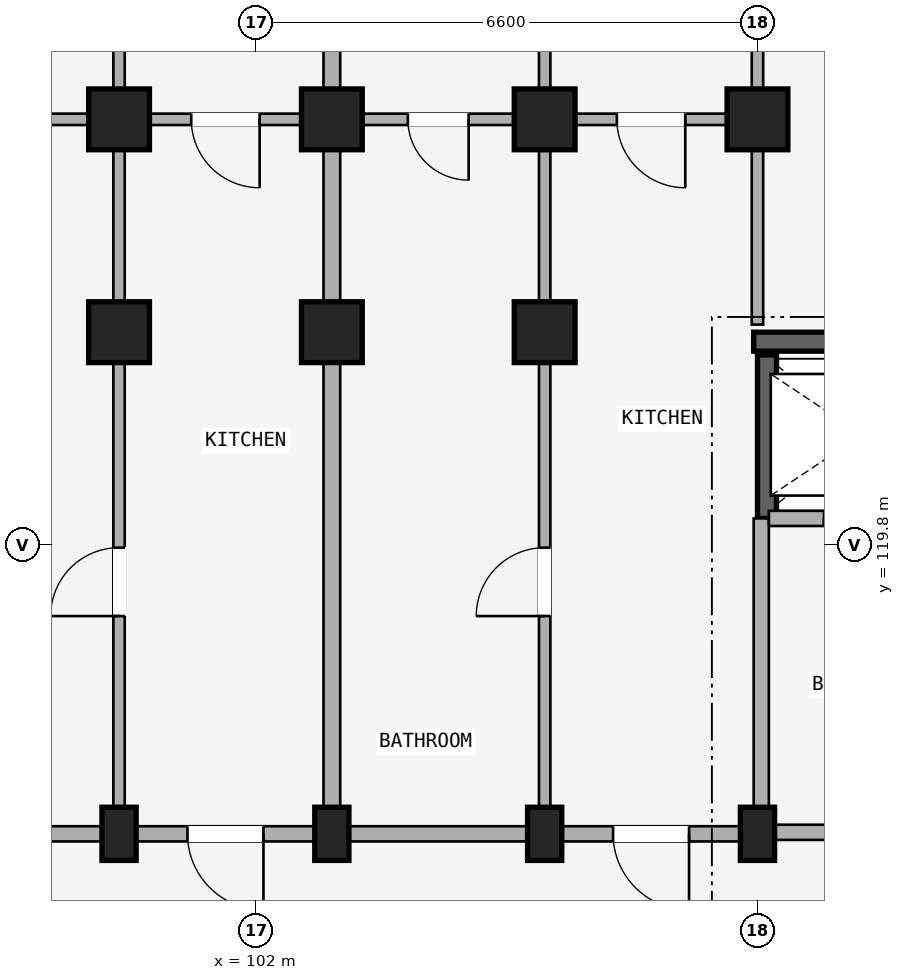
"""IFC4 building model, lengths in metres.
Left out: names, types, materials, properties, quantities, classifications, styles, units other than length and angle.
Written with IfcOpenShell. Run it as: python <this file> out.ifc"""

import sys

from ifc_helpers import new_model, si_unit, direction, frame, frame_2d, origin, origin_2d, place, context, subcontext, project, spatial, rectangle, extrude, element, fill, save


model = new_model("IFC4")
c1 = context("Model", 3, precision=1e-05, world=origin(), true_north=direction((0.0, 1.0)))
c2 = subcontext(c1, "Body", "Model", "MODEL_VIEW")
j1 = project(units=[si_unit("LENGTHUNIT", "METRE"), si_unit("PLANEANGLEUNIT", "RADIAN")], contexts=[c1])
p1 = place(None, origin())
s1 = spatial("IfcSite", under=j1, at=p1, CompositionType="ELEMENT")
p2 = place(p1, origin())
s2 = spatial("IfcBuilding", under=s1, at=p2, CompositionType="ELEMENT")
p3 = place(p2, frame((0.0, 0.0, 15.0)))
s3 = spatial("IfcBuildingStorey", under=s2, at=p3, CompositionType="ELEMENT", Elevation=15.0)
p4 = place(p3, frame((111.35, 122.475, 0.0), z_axis=(0.0, 0.0, 1.0), x_axis=(-1.0, 0.0, 0.0)))
e1 = element("IfcWall", 1, at=p4, inside=s3, PredefinedType="SHEAR", context=c2, shape_type="SweptSolid", body=[
    extrude(rectangle(XDim=2.8, YDim=0.25, at=frame_2d((1.4, 0.0))), origin(), (0.0, 0.0, 1.0), 2.93),
])
p5 = place(p3, frame((108.725, 120.15, 0.0), z_axis=(0.0, 0.0, 1.0), x_axis=(0.0, 1.0, 0.0)))
e2 = element("IfcWall", 2, at=p5, inside=s3, PredefinedType="SHEAR", context=c2, shape_type="SweptSolid", body=[
    extrude(rectangle(XDim=2.15, YDim=0.25, at=frame_2d((1.075, 0.0))), origin(), (0.0, 0.0, 1.0), 2.93),
])
p6 = place(p3, frame((108.6, 116.0, 0.0), z_axis=(0.0, 0.0, 1.0), x_axis=(1.0, 0.0, 0.0)))
e3 = element("IfcColumn", 3, at=p6, inside=s3, PredefinedType="COLUMN", context=c2, shape_type="SweptSolid", body=[
    extrude(rectangle(XDim=0.45, YDim=0.7, at=origin_2d()), origin(), (0.0, 0.0, 1.0), 2.93),
])
p7 = place(p3, frame((108.6, 125.4, 0.0), z_axis=(0.0, 0.0, 1.0), x_axis=(1.0, 0.0, 0.0)))
e4 = element("IfcColumn", 4, at=p7, inside=s3, PredefinedType="COLUMN", context=c2, shape_type="SweptSolid", body=[
    extrude(rectangle(XDim=0.8, YDim=0.8, at=origin_2d()), origin(), (0.0, 0.0, 1.0), 2.93),
])
p8 = place(p3, frame((105.8, 116.0, 0.0), z_axis=(0.0, 0.0, 1.0), x_axis=(1.0, 0.0, 0.0)))
e5 = element("IfcColumn", 5, at=p8, inside=s3, PredefinedType="COLUMN", context=c2, shape_type="SweptSolid", body=[
    extrude(rectangle(XDim=0.45, YDim=0.7, at=origin_2d()), origin(), (0.0, 0.0, 1.0), 2.93),
])
for number, where, z_axis, x_axis in (
    (6, (105.8, 122.6, 0.0), (0.0, 0.0, 1.0), (1.0, 0.0, 0.0)),
    (7, (105.8, 125.4, 0.0), (0.0, 0.0, 1.0), (1.0, 0.0, 0.0)),
):
    element("IfcColumn", number, at=place(p3, frame(where, z_axis=z_axis, x_axis=x_axis)), inside=s3, PredefinedType="COLUMN", context=c2, shape_type="SweptSolid", body=[
        extrude(rectangle(XDim=0.8, YDim=0.8, at=origin_2d()), origin(), (0.0, 0.0, 1.0), 2.93),
    ])
p9 = place(p3, frame((103.0, 116.0, 0.0), z_axis=(0.0, 0.0, 1.0), x_axis=(1.0, 0.0, 0.0)))
e8 = element("IfcColumn", 8, at=p9, inside=s3, PredefinedType="COLUMN", context=c2, shape_type="SweptSolid", body=[
    extrude(rectangle(XDim=0.45, YDim=0.7, at=origin_2d()), origin(), (0.0, 0.0, 1.0), 2.93),
])
for number, where, z_axis, x_axis in (
    (9, (103.0, 122.6, 0.0), (0.0, 0.0, 1.0), (1.0, 0.0, 0.0)),
    (10, (103.0, 125.4, 0.0), (0.0, 0.0, 1.0), (1.0, 0.0, 0.0)),
):
    element("IfcColumn", number, at=place(p3, frame(where, z_axis=z_axis, x_axis=x_axis)), inside=s3, PredefinedType="COLUMN", context=c2, shape_type="SweptSolid", body=[
        extrude(rectangle(XDim=0.8, YDim=0.8, at=origin_2d()), origin(), (0.0, 0.0, 1.0), 2.93),
    ])
p10 = place(p3, frame((100.2, 116.0, 0.0), z_axis=(0.0, 0.0, 1.0), x_axis=(1.0, 0.0, 0.0)))
e11 = element("IfcColumn", 11, at=p10, inside=s3, PredefinedType="COLUMN", context=c2, shape_type="SweptSolid", body=[
    extrude(rectangle(XDim=0.45, YDim=0.7, at=origin_2d()), origin(), (0.0, 0.0, 1.0), 2.93),
])
for number, where, z_axis, x_axis in (
    (12, (100.2, 122.6, 0.0), (0.0, 0.0, 1.0), (1.0, 0.0, 0.0)),
    (13, (100.2, 125.4, 0.0), (0.0, 0.0, 1.0), (1.0, 0.0, 0.0)),
):
    element("IfcColumn", number, at=place(p3, frame(where, z_axis=z_axis, x_axis=x_axis)), inside=s3, PredefinedType="COLUMN", context=c2, shape_type="SweptSolid", body=[
        extrude(rectangle(XDim=0.8, YDim=0.8, at=origin_2d()), origin(), (0.0, 0.0, 1.0), 2.93),
    ])
p11 = place(p3, frame((114.3, 116.02, 0.0), z_axis=(0.0, 0.0, 1.0), x_axis=(-1.0, 0.0, 0.0)))
e14 = element("IfcWall", 14, at=p11, inside=s3, PredefinedType="STANDARD", context=c2, shape_type="SweptSolid", body=[
    extrude(rectangle(XDim=5.65, YDim=0.2, at=frame_2d((2.825, 0.0))), origin(), (0.0, 0.0, 1.0), 2.372),
])
p12 = place(p11, frame((1.923, 0.0, 0.0)))
e15 = element("IfcOpeningElement", 15, at=p12, cuts=e14, PredefinedType="OPENING", context=c2, shape_type="SweptSolid", body=[
    extrude(rectangle(XDim=1.24, YDim=2.15, at=frame_2d((0.62, 1.075))), frame((0.0, 0.11, 0.0), z_axis=(0.0, -1.0, 0.0), x_axis=(1.0, 0.0, 0.0)), (0.0, 0.0, 1.0), 0.22),
])
p13 = place(p3, frame((108.65, 116.02, 0.0), z_axis=(0.0, 0.0, 1.0), x_axis=(0.0, 1.0, 0.0)))
e16 = element("IfcWall", 16, at=p13, inside=s3, PredefinedType="STANDARD", context=c2, shape_type="SweptSolid", body=[
    extrude(rectangle(XDim=4.13, YDim=0.2, at=frame_2d((2.065, 0.0))), origin(), (0.0, 0.0, 1.0), 2.372),
])
p14 = place(p3, frame((111.3, 120.15, 0.0), z_axis=(0.0, 0.0, 1.0), x_axis=(-1.0, 0.0, 0.0)))
e17 = element("IfcWall", 17, at=p14, inside=s3, PredefinedType="STANDARD", context=c2, shape_type="SweptSolid", body=[
    extrude(rectangle(XDim=2.55, YDim=0.2, at=frame_2d((1.275, 0.0))), origin(), (0.0, 0.0, 1.0), 2.372),
])
p15 = place(p14, frame((0.725, 0.0, 0.0)))
e18 = element("IfcOpeningElement", 18, at=p15, cuts=e17, PredefinedType="OPENING", context=c2, shape_type="SweptSolid", body=[
    extrude(rectangle(XDim=1.1, YDim=2.15, at=frame_2d((0.55, 1.075))), frame((0.0, 0.11, 0.0), z_axis=(0.0, -1.0, 0.0), x_axis=(1.0, 0.0, 0.0)), (0.0, 0.0, 1.0), 0.22),
])
p16 = place(p3, frame((108.6, 116.0, 0.0), z_axis=(0.0, 0.0, 1.0), x_axis=(-1.0, 0.0, 0.0)))
e19 = element("IfcWall", 19, at=p16, inside=s3, PredefinedType="STANDARD", context=c2, shape_type="SweptSolid", body=[
    extrude(rectangle(XDim=2.8, YDim=0.2, at=frame_2d((1.4, 0.0))), origin(), (0.0, 0.0, 1.0), 2.372),
])
p17 = place(p16, frame((0.9, 0.0, 0.0)))
e20 = element("IfcOpeningElement", 20, at=p17, cuts=e19, PredefinedType="OPENING", context=c2, shape_type="SweptSolid", body=[
    extrude(rectangle(XDim=1.0, YDim=2.15, at=frame_2d((0.5, 1.075))), frame((0.0, 0.11, 0.0), z_axis=(0.0, -1.0, 0.0), x_axis=(1.0, 0.0, 0.0)), (0.0, 0.0, 1.0), 0.22),
])
p18 = place(p3, frame((108.52, 125.4, 0.0), z_axis=(0.0, 0.0, 1.0), x_axis=(-1.0, 0.0, 0.0)))
e21 = element("IfcWall", 21, at=p18, inside=s3, PredefinedType="PLUMBINGWALL", context=c2, shape_type="SweptSolid", body=[
    extrude(rectangle(XDim=2.64, YDim=0.15, at=frame_2d((1.32, 0.0))), origin(), (0.0, 0.0, 1.0), 2.372),
])
p19 = place(p18, frame((0.87, 0.0, 0.0)))
e22 = element("IfcOpeningElement", 22, at=p19, cuts=e21, PredefinedType="OPENING", context=c2, shape_type="SweptSolid", body=[
    extrude(rectangle(XDim=0.9, YDim=2.1, at=frame_2d((0.45, 1.05))), frame((0.0, 0.085, 0.0), z_axis=(0.0, -1.0, 0.0), x_axis=(1.0, 0.0, 0.0)), (0.0, 0.0, 1.0), 0.17),
])
p20 = place(p3, frame((105.8, 116.0, 0.0), z_axis=(0.0, 0.0, 1.0), x_axis=(-1.0, 0.0, 0.0)))
e23 = element("IfcWall", 23, at=p20, inside=s3, PredefinedType="STANDARD", context=c2, shape_type="SweptSolid", body=[
    extrude(rectangle(XDim=2.8, YDim=0.2, at=frame_2d((1.4, 0.0))), origin(), (0.0, 0.0, 1.0), 2.372),
])
p21 = place(p3, frame((105.72, 125.4, 0.0), z_axis=(0.0, 0.0, 1.0), x_axis=(-1.0, 0.0, 0.0)))
e24 = element("IfcWall", 24, at=p21, inside=s3, PredefinedType="PLUMBINGWALL", context=c2, shape_type="SweptSolid", body=[
    extrude(rectangle(XDim=2.64, YDim=0.15, at=frame_2d((1.32, 0.0))), origin(), (0.0, 0.0, 1.0), 2.372),
])
p22 = place(p21, frame((0.92, 0.0, 0.0)))
e25 = element("IfcOpeningElement", 25, at=p22, cuts=e24, PredefinedType="OPENING", context=c2, shape_type="SweptSolid", body=[
    extrude(rectangle(XDim=0.8, YDim=2.1, at=frame_2d((0.4, 1.05))), frame((0.0, 0.085, 0.0), z_axis=(0.0, -1.0, 0.0), x_axis=(1.0, 0.0, 0.0)), (0.0, 0.0, 1.0), 0.17),
])
p23 = place(p3, frame((103.0, 116.0, 0.0), z_axis=(0.0, 0.0, 1.0), x_axis=(-1.0, 0.0, 0.0)))
e26 = element("IfcWall", 26, at=p23, inside=s3, PredefinedType="STANDARD", context=c2, shape_type="SweptSolid", body=[
    extrude(rectangle(XDim=2.8, YDim=0.2, at=frame_2d((1.4, 0.0))), origin(), (0.0, 0.0, 1.0), 2.372),
])
p24 = place(p23, frame((0.9, 0.0, 0.0)))
e27 = element("IfcOpeningElement", 27, at=p24, cuts=e26, PredefinedType="OPENING", context=c2, shape_type="SweptSolid", body=[
    extrude(rectangle(XDim=1.0, YDim=2.15, at=frame_2d((0.5, 1.075))), frame((0.0, 0.11, 0.0), z_axis=(0.0, -1.0, 0.0), x_axis=(1.0, 0.0, 0.0)), (0.0, 0.0, 1.0), 0.22),
])
p25 = place(p3, frame((102.92, 125.4, 0.0), z_axis=(0.0, 0.0, 1.0), x_axis=(-1.0, 0.0, 0.0)))
e28 = element("IfcWall", 28, at=p25, inside=s3, PredefinedType="PLUMBINGWALL", context=c2, shape_type="SweptSolid", body=[
    extrude(rectangle(XDim=2.64, YDim=0.15, at=frame_2d((1.32, 0.0))), origin(), (0.0, 0.0, 1.0), 2.372),
])
p26 = place(p25, frame((0.87, 0.0, 0.0)))
e29 = element("IfcOpeningElement", 29, at=p26, cuts=e28, PredefinedType="OPENING", context=c2, shape_type="SweptSolid", body=[
    extrude(rectangle(XDim=0.9, YDim=2.1, at=frame_2d((0.45, 1.05))), frame((0.0, 0.085, 0.0), z_axis=(0.0, -1.0, 0.0), x_axis=(1.0, 0.0, 0.0)), (0.0, 0.0, 1.0), 0.17),
])
p27 = place(p3, frame((100.2, 116.0, 0.0), z_axis=(0.0, 0.0, 1.0), x_axis=(-1.0, 0.0, 0.0)))
e30 = element("IfcWall", 30, at=p27, inside=s3, PredefinedType="STANDARD", context=c2, shape_type="SweptSolid", body=[
    extrude(rectangle(XDim=2.8, YDim=0.2, at=frame_2d((1.4, 0.0))), origin(), (0.0, 0.0, 1.0), 2.372),
])
p28 = place(p3, frame((100.12, 125.4, 0.0), z_axis=(0.0, 0.0, 1.0), x_axis=(-1.0, 0.0, 0.0)))
e31 = element("IfcWall", 31, at=p28, inside=s3, PredefinedType="PLUMBINGWALL", context=c2, shape_type="SweptSolid", body=[
    extrude(rectangle(XDim=2.64, YDim=0.15, at=frame_2d((1.32, 0.0))), origin(), (0.0, 0.0, 1.0), 2.372),
])
p29 = place(p28, frame((0.92, 0.0, 0.0)))
e32 = element("IfcOpeningElement", 32, at=p29, cuts=e31, PredefinedType="OPENING", context=c2, shape_type="SweptSolid", body=[
    extrude(rectangle(XDim=0.8, YDim=2.1, at=frame_2d((0.4, 1.05))), frame((0.0, 0.085, 0.0), z_axis=(0.0, -1.0, 0.0), x_axis=(1.0, 0.0, 0.0)), (0.0, 0.0, 1.0), 0.17),
])
p30 = place(p3, frame((108.6, 122.7, 0.0), z_axis=(0.0, 0.0, 1.0), x_axis=(0.0, 1.0, 0.0)))
e33 = element("IfcWall", 33, at=p30, inside=s3, PredefinedType="PARTITIONING", context=c2, shape_type="SweptSolid", body=[
    extrude(rectangle(XDim=10.82, YDim=0.15, at=frame_2d((5.41, 0.0))), origin(), (0.0, 0.0, 1.0), 2.372),
])
p31 = place(p30, frame((3.7, 0.0, 0.0)))
e34 = element("IfcOpeningElement", 34, at=p31, cuts=e33, PredefinedType="OPENING", context=c2, shape_type="SweptSolid", body=[
    extrude(rectangle(XDim=0.8, YDim=2.1, at=frame_2d((0.4, 1.05))), frame((0.0, 0.085, 0.0), z_axis=(0.0, -1.0, 0.0), x_axis=(1.0, 0.0, 0.0)), (0.0, 0.0, 1.0), 0.17),
])
p32 = place(p3, frame((105.8, 116.05, 0.0), z_axis=(0.0, 0.0, 1.0), x_axis=(0.0, 1.0, 0.0)))
e35 = element("IfcWall", 35, at=p32, inside=s3, PredefinedType="PARTITIONING", context=c2, shape_type="SweptSolid", body=[
    extrude(rectangle(XDim=6.53, YDim=0.15, at=frame_2d((3.265, 0.0))), origin(), (0.0, 0.0, 1.0), 2.372),
])
p33 = place(p32, frame((2.815, 0.0, 0.0)))
e36 = element("IfcOpeningElement", 36, at=p33, cuts=e35, PredefinedType="OPENING", context=c2, shape_type="SweptSolid", body=[
    extrude(rectangle(XDim=0.9, YDim=2.1, at=frame_2d((0.45, 1.05))), frame((0.0, 0.085, 0.0), z_axis=(0.0, -1.0, 0.0), x_axis=(1.0, 0.0, 0.0)), (0.0, 0.0, 1.0), 0.17),
])
p34 = place(p3, frame((105.8, 122.7, 0.0), z_axis=(0.0, 0.0, 1.0), x_axis=(0.0, 1.0, 0.0)))
e37 = element("IfcWall", 37, at=p34, inside=s3, PredefinedType="PARTITIONING", context=c2, shape_type="SweptSolid", body=[
    extrude(rectangle(XDim=10.82, YDim=0.15, at=frame_2d((5.41, 0.0))), origin(), (0.0, 0.0, 1.0), 2.372),
])
p35 = place(p34, frame((3.7, 0.0, 0.0)))
e38 = element("IfcOpeningElement", 38, at=p35, cuts=e37, PredefinedType="OPENING", context=c2, shape_type="SweptSolid", body=[
    extrude(rectangle(XDim=0.8, YDim=2.1, at=frame_2d((0.4, 1.05))), frame((0.0, 0.085, 0.0), z_axis=(0.0, -1.0, 0.0), x_axis=(1.0, 0.0, 0.0)), (0.0, 0.0, 1.0), 0.17),
])
p36 = place(p3, frame((103.0, 116.05, 0.0), z_axis=(0.0, 0.0, 1.0), x_axis=(0.0, 1.0, 0.0)))
e39 = element("IfcWall", 39, at=p36, inside=s3, PredefinedType="STANDARD", context=c2, shape_type="SweptSolid", body=[
    extrude(rectangle(XDim=6.53, YDim=0.22, at=frame_2d((3.265, 0.0))), origin(), (0.0, 0.0, 1.0), 2.372),
])
p37 = place(p3, frame((103.0, 122.7, 0.0), z_axis=(0.0, 0.0, 1.0), x_axis=(0.0, 1.0, 0.0)))
e40 = element("IfcWall", 40, at=p37, inside=s3, PredefinedType="STANDARD", context=c2, shape_type="SweptSolid", body=[
    extrude(rectangle(XDim=10.82, YDim=0.22, at=frame_2d((5.41, 0.0))), origin(), (0.0, 0.0, 1.0), 2.372),
])
p38 = place(p3, frame((100.2, 116.05, 0.0), z_axis=(0.0, 0.0, 1.0), x_axis=(0.0, 1.0, 0.0)))
e41 = element("IfcWall", 41, at=p38, inside=s3, PredefinedType="PARTITIONING", context=c2, shape_type="SweptSolid", body=[
    extrude(rectangle(XDim=6.53, YDim=0.15, at=frame_2d((3.265, 0.0))), origin(), (0.0, 0.0, 1.0), 2.372),
])
p39 = place(p38, frame((2.815, 0.0, 0.0)))
e42 = element("IfcOpeningElement", 42, at=p39, cuts=e41, PredefinedType="OPENING", context=c2, shape_type="SweptSolid", body=[
    extrude(rectangle(XDim=0.9, YDim=2.1, at=frame_2d((0.45, 1.05))), frame((0.0, 0.085, 0.0), z_axis=(0.0, -1.0, 0.0), x_axis=(1.0, 0.0, 0.0)), (0.0, 0.0, 1.0), 0.17),
])
p40 = place(p3, frame((100.2, 122.7, 0.0), z_axis=(0.0, 0.0, 1.0), x_axis=(0.0, 1.0, 0.0)))
e43 = element("IfcWall", 43, at=p40, inside=s3, PredefinedType="PARTITIONING", context=c2, shape_type="SweptSolid", body=[
    extrude(rectangle(XDim=10.82, YDim=0.15, at=frame_2d((5.41, 0.0))), origin(), (0.0, 0.0, 1.0), 2.372),
])
p41 = place(p40, frame((3.7, 0.0, 0.0)))
e44 = element("IfcOpeningElement", 44, at=p41, cuts=e43, PredefinedType="OPENING", context=c2, shape_type="SweptSolid", body=[
    extrude(rectangle(XDim=0.8, YDim=2.1, at=frame_2d((0.4, 1.05))), frame((0.0, 0.085, 0.0), z_axis=(0.0, -1.0, 0.0), x_axis=(1.0, 0.0, 0.0)), (0.0, 0.0, 1.0), 0.17),
])
p42 = place(p15, origin())
e45 = element("IfcDoor", 45, at=p42, inside=s3, OperationType="SLIDING_TO_LEFT", PredefinedType="DOOR", context=c2, shape_type="SweptSolid", body=[
    extrude(rectangle(XDim=1.1, YDim=2.15, at=frame_2d((0.55, 1.075))), frame((0.0, 0.025, 0.0), z_axis=(0.0, -1.0, 0.0), x_axis=(1.0, 0.0, 0.0)), (0.0, 0.0, 1.0), 0.05),
])
fill(e18, e45)
p43 = place(p19, frame((0.9, 0.0, 0.0), z_axis=(0.0, 0.0, 1.0), x_axis=(-1.0, 0.0, 0.0)))
e46 = element("IfcDoor", 46, at=p43, inside=s3, OperationType="SINGLE_SWING_RIGHT", PredefinedType="DOOR", context=c2, shape_type="SweptSolid", body=[
    extrude(rectangle(XDim=0.9, YDim=2.1, at=frame_2d((0.45, 1.05))), frame((0.0, 0.025, 0.0), z_axis=(0.0, -1.0, 0.0), x_axis=(1.0, 0.0, 0.0)), (0.0, 0.0, 1.0), 0.05),
])
fill(e22, e46)
p44 = place(p17, origin())
e47 = element("IfcDoor", 47, at=p44, inside=s3, OperationType="SINGLE_SWING_LEFT", PredefinedType="DOOR", context=c2, shape_type="SweptSolid", body=[
    extrude(rectangle(XDim=1.0, YDim=2.15, at=frame_2d((0.5, 1.075))), frame((0.0, 0.025, 0.0), z_axis=(0.0, -1.0, 0.0), x_axis=(1.0, 0.0, 0.0)), (0.0, 0.0, 1.0), 0.05),
])
fill(e20, e47)
p45 = place(p22, frame((0.8, 0.0, 0.0), z_axis=(0.0, 0.0, 1.0), x_axis=(-1.0, 0.0, 0.0)))
e48 = element("IfcDoor", 48, at=p45, inside=s3, OperationType="SINGLE_SWING_RIGHT", PredefinedType="DOOR", context=c2, shape_type="SweptSolid", body=[
    extrude(rectangle(XDim=0.8, YDim=2.1, at=frame_2d((0.4, 1.05))), frame((0.0, 0.025, 0.0), z_axis=(0.0, -1.0, 0.0), x_axis=(1.0, 0.0, 0.0)), (0.0, 0.0, 1.0), 0.05),
])
fill(e25, e48)
p46 = place(p26, frame((0.9, 0.0, 0.0), z_axis=(0.0, 0.0, 1.0), x_axis=(-1.0, 0.0, 0.0)))
e49 = element("IfcDoor", 49, at=p46, inside=s3, OperationType="SINGLE_SWING_RIGHT", PredefinedType="DOOR", context=c2, shape_type="SweptSolid", body=[
    extrude(rectangle(XDim=0.9, YDim=2.1, at=frame_2d((0.45, 1.05))), frame((0.0, 0.025, 0.0), z_axis=(0.0, -1.0, 0.0), x_axis=(1.0, 0.0, 0.0)), (0.0, 0.0, 1.0), 0.05),
])
fill(e29, e49)
p47 = place(p24, origin())
e50 = element("IfcDoor", 50, at=p47, inside=s3, OperationType="SINGLE_SWING_LEFT", PredefinedType="DOOR", context=c2, shape_type="SweptSolid", body=[
    extrude(rectangle(XDim=1.0, YDim=2.15, at=frame_2d((0.5, 1.075))), frame((0.0, 0.025, 0.0), z_axis=(0.0, -1.0, 0.0), x_axis=(1.0, 0.0, 0.0)), (0.0, 0.0, 1.0), 0.05),
])
fill(e27, e50)
p48 = place(p33, origin())
e51 = element("IfcDoor", 51, at=p48, inside=s3, OperationType="SINGLE_SWING_LEFT", PredefinedType="DOOR", context=c2, shape_type="SweptSolid", body=[
    extrude(rectangle(XDim=0.9, YDim=2.1, at=frame_2d((0.45, 1.05))), frame((0.0, 0.025, 0.0), z_axis=(0.0, -1.0, 0.0), x_axis=(1.0, 0.0, 0.0)), (0.0, 0.0, 1.0), 0.05),
])
fill(e36, e51)
p49 = place(p39, frame((0.9, 0.0, 0.0), z_axis=(0.0, 0.0, 1.0), x_axis=(-1.0, 0.0, 0.0)))
e52 = element("IfcDoor", 52, at=p49, inside=s3, OperationType="SINGLE_SWING_RIGHT", PredefinedType="DOOR", context=c2, shape_type="SweptSolid", body=[
    extrude(rectangle(XDim=0.9, YDim=2.1, at=frame_2d((0.45, 1.05))), frame((0.0, 0.025, 0.0), z_axis=(0.0, -1.0, 0.0), x_axis=(1.0, 0.0, 0.0)), (0.0, 0.0, 1.0), 0.05),
])
fill(e42, e52)
save(model, sys.argv[1])
